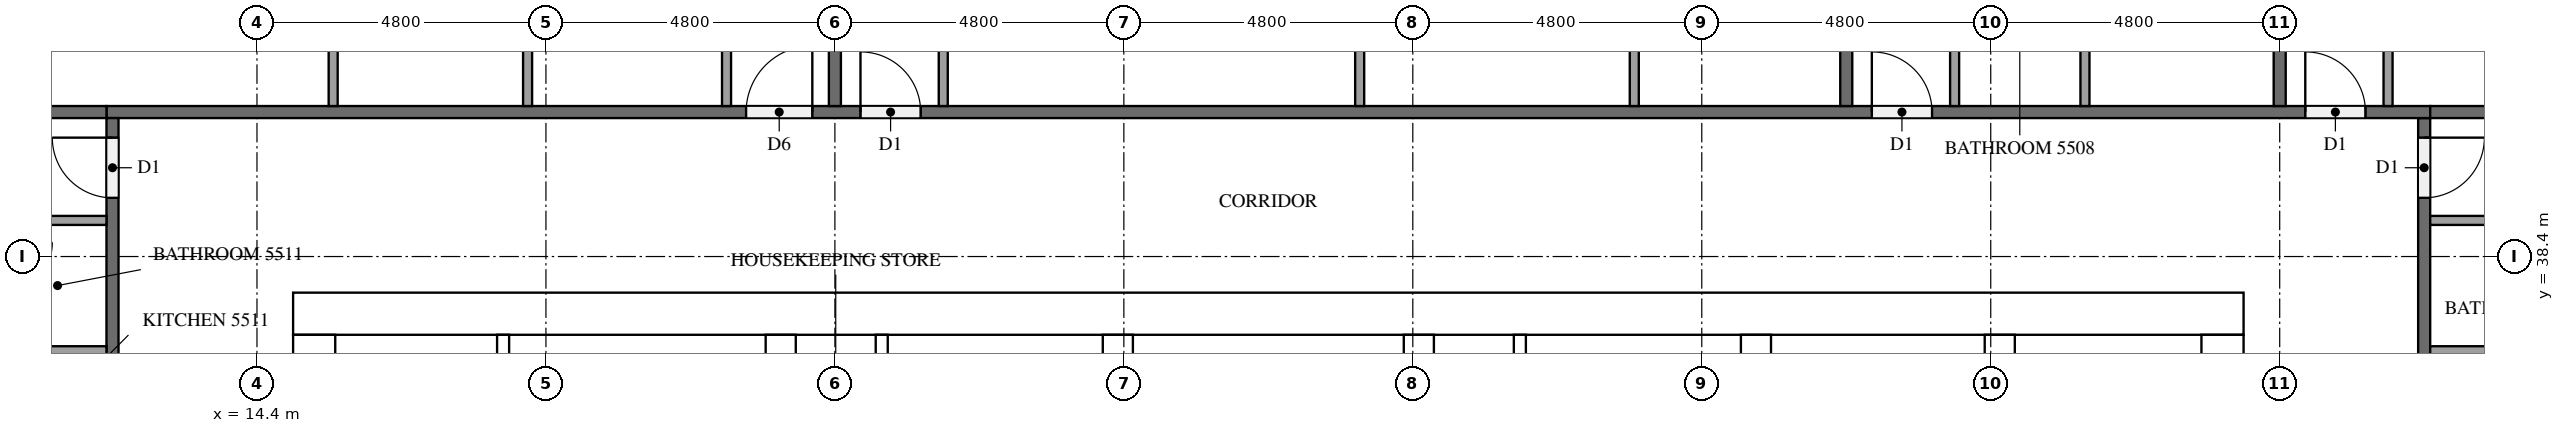
"""IFC4 building model, lengths in metres.
Left out: names, types, materials, properties, quantities, classifications, styles, units other than length and angle.
Written with IfcOpenShell. Run it as: python <this file> out.ifc"""

import sys

from ifc_helpers import new_model, si_unit, direction, frame, frame_2d, origin, place, context, subcontext, project, spatial, rectangle, extrude, element, fill, save


model = new_model("IFC4")
c1 = context("Model", 3, precision=1e-05, world=origin(), true_north=direction((0.0, 1.0)))
c2 = subcontext(c1, "Body", "Model", "MODEL_VIEW")
j1 = project(units=[si_unit("LENGTHUNIT", "METRE"), si_unit("PLANEANGLEUNIT", "RADIAN")], contexts=[c1])
p1 = place(None, origin())
s1 = spatial("IfcSite", under=j1, at=p1, CompositionType="ELEMENT")
p2 = place(p1, origin())
s2 = spatial("IfcBuilding", under=s1, at=p2, CompositionType="ELEMENT")
p3 = place(p2, frame((0.0, 0.0, 212.3)))
s3 = spatial("IfcBuildingStorey", under=s2, at=p3, CompositionType="ELEMENT", Elevation=212.3)
p4 = place(p3, frame((15.0, 37.45, 0.0), z_axis=(0.0, 0.0, 1.0), x_axis=(1.0, 0.0, 0.0)))
e1 = element("IfcWall", 1, at=p4, inside=s3, PredefinedType="SHEAR", context=c2, shape_type="SweptSolid", body=[
    extrude(rectangle(XDim=32.4, YDim=0.7, at=frame_2d((16.2, 0.0))), origin(), (0.0, 0.0, 1.0), 3.2),
])
p5 = place(p4, frame((15.3, 0.0, 0.0)))
e2 = element("IfcOpeningElement", 2, at=p5, cuts=e1, PredefinedType="OPENING", context=c2, shape_type="SweptSolid", body=[
    extrude(rectangle(XDim=1.8, YDim=2.1, at=frame_2d((0.9, 1.05))), frame((0.0, 0.36, 0.0), z_axis=(0.0, -1.0, 0.0), x_axis=(1.0, 0.0, 0.0)), (0.0, 0.0, 1.0), 0.72),
])
p6 = place(p4, frame((1.544, 0.0, 0.0)))
e3 = element("IfcOpeningElement", 3, at=p6, cuts=e1, PredefinedType="OPENING", context=c2, shape_type="SweptSolid", body=[
    extrude(rectangle(XDim=1.0, YDim=2.1, at=frame_2d((0.5, 1.05))), frame((0.0, 0.36, 0.0), z_axis=(0.0, -1.0, 0.0), x_axis=(1.0, 0.0, 0.0)), (0.0, 0.0, 1.0), 0.72),
])
p7 = place(p4, frame((5.219, 0.0, 0.0)))
e4 = element("IfcOpeningElement", 4, at=p7, cuts=e1, PredefinedType="OPENING", context=c2, shape_type="SweptSolid", body=[
    extrude(rectangle(XDim=1.0, YDim=2.1, at=frame_2d((0.5, 1.05))), frame((0.0, 0.36, 0.0), z_axis=(0.0, -1.0, 0.0), x_axis=(1.0, 0.0, 0.0)), (0.0, 0.0, 1.0), 0.72),
])
p8 = place(p3, frame((15.35, 15.7, 0.0), z_axis=(0.0, 0.0, 1.0), x_axis=(0.0, 1.0, 0.0)))
e5 = element("IfcWall", 5, at=p8, inside=s3, PredefinedType="SHEAR", context=c2, shape_type="SweptSolid", body=[
    extrude(rectangle(XDim=21.4, YDim=0.7, at=frame_2d((10.7, 0.0))), origin(), (0.0, 0.0, 1.0), 3.2),
])
p9 = place(p8, frame((5.06, 0.0, 0.0)))
e6 = element("IfcOpeningElement", 6, at=p9, cuts=e5, PredefinedType="OPENING", context=c2, shape_type="SweptSolid", body=[
    extrude(rectangle(XDim=1.2, YDim=2.1, at=frame_2d((0.6, 1.05))), frame((0.0, 0.36, 0.0), z_axis=(0.0, -1.0, 0.0), x_axis=(1.0, 0.0, 0.0)), (0.0, 0.0, 1.0), 0.72),
])
p10 = place(p3, frame((47.05, 15.7, 0.0), z_axis=(0.0, 0.0, 1.0), x_axis=(0.0, 1.0, 0.0)))
e7 = element("IfcWall", 7, at=p10, inside=s3, PredefinedType="SHEAR", context=c2, shape_type="SweptSolid", body=[
    extrude(rectangle(XDim=21.4, YDim=0.7, at=frame_2d((10.7, 0.0))), origin(), (0.0, 0.0, 1.0), 3.2),
])
p11 = place(p10, frame((10.4, 0.0, 0.0)))
e8 = element("IfcOpeningElement", 8, at=p11, cuts=e7, PredefinedType="OPENING", context=c2, shape_type="SweptSolid", body=[
    extrude(rectangle(XDim=1.2, YDim=2.1, at=frame_2d((0.6, 1.05))), frame((0.0, 0.36, 0.0), z_axis=(0.0, -1.0, 0.0), x_axis=(1.0, 0.0, 0.0)), (0.0, 0.0, 1.0), 0.72),
])
p12 = place(p3, frame((23.1, 15.7, 0.0), z_axis=(0.0, 0.0, 1.0), x_axis=(0.0, 1.0, 0.0)))
e9 = element("IfcWall", 9, at=p12, inside=s3, PredefinedType="SHEAR", context=c2, shape_type="SweptSolid", body=[
    extrude(rectangle(XDim=21.4, YDim=0.5, at=frame_2d((10.7, 0.0))), origin(), (0.0, 0.0, 1.0), 3.2),
])
p13 = place(p3, frame((39.3, 27.75, 0.0), z_axis=(0.0, 0.0, 1.0), x_axis=(0.0, 1.0, 0.0)))
e10 = element("IfcWall", 10, at=p13, inside=s3, PredefinedType="SHEAR", context=c2, shape_type="SweptSolid", body=[
    extrude(rectangle(XDim=9.35, YDim=0.5, at=frame_2d((4.675, 0.0))), origin(), (0.0, 0.0, 1.0), 3.2),
])
p14 = place(p3, frame((43.35, 27.75, 0.0), z_axis=(0.0, 0.0, 1.0), x_axis=(0.0, 1.0, 0.0)))
e11 = element("IfcWall", 11, at=p14, inside=s3, PredefinedType="SHEAR", context=c2, shape_type="SweptSolid", body=[
    extrude(rectangle(XDim=9.35, YDim=0.5, at=frame_2d((4.675, 0.0))), origin(), (0.0, 0.0, 1.0), 3.2),
])
p15 = place(p14, frame((7.65, 0.0, 0.0)))
e12 = element("IfcOpeningElement", 12, at=p15, cuts=e11, PredefinedType="OPENING", context=c2, shape_type="SweptSolid", body=[
    extrude(rectangle(XDim=1.2, YDim=2.1, at=frame_2d((0.6, 1.05))), frame((0.0, 0.26, 0.0), z_axis=(0.0, -1.0, 0.0), x_axis=(1.0, 0.0, 0.0)), (0.0, 0.0, 1.0), 0.52),
])
for number, where, z_axis, x_axis in (
    (13, (28.7, 33.8, 0.0), (0.0, 0.0, 1.0), (0.0, 1.0, 0.0)),
    (14, (33.7, 33.8, 0.0), (0.0, 0.0, 1.0), (0.0, 1.0, 0.0)),
):
    element("IfcWall", number, at=place(p3, frame(where, z_axis=z_axis, x_axis=x_axis)), inside=s3, PredefinedType="SHEAR", context=c2, shape_type="SweptSolid", body=[
        extrude(rectangle(XDim=3.3, YDim=0.5, at=frame_2d((1.65, 0.0))), origin(), (0.0, 0.0, 1.0), 3.2),
    ])
p16 = place(p3, frame((18.489, 31.5, 0.0), z_axis=(0.0, 0.0, 1.0), x_axis=(0.0, 1.0, 0.0)))
e15 = element("IfcWall", 15, at=p16, inside=s3, PredefinedType="PARTITIONING", context=c2, shape_type="SweptSolid", body=[
    extrude(rectangle(XDim=5.6, YDim=0.2, at=frame_2d((2.8, 0.0))), origin(), (0.0, 0.0, 1.0), 3.2),
])
for number, where, z_axis, x_axis in (
    (16, (24.778, 33.8, 0.0), (0.0, 0.0, 1.0), (0.0, 1.0, 0.0)),
    (17, (35.378, 33.8, 0.0), (0.0, 0.0, 1.0), (0.0, 1.0, 0.0)),
):
    element("IfcWall", number, at=place(p3, frame(where, z_axis=z_axis, x_axis=x_axis)), inside=s3, PredefinedType="PARTITIONING", context=c2, shape_type="SweptSolid", body=[
        extrude(rectangle(XDim=3.3, YDim=0.2, at=frame_2d((1.65, 0.0))), origin(), (0.0, 0.0, 1.0), 3.2),
    ])
p17 = place(p3, frame((50.4, 40.7, 0.0), z_axis=(0.0, 0.0, 1.0), x_axis=(0.0, -1.0, 0.0)))
e18 = element("IfcWall", 18, at=p17, inside=s3, PredefinedType="PARTITIONING", context=c2, shape_type="SweptSolid", body=[
    extrude(rectangle(XDim=28.6, YDim=0.2, at=frame_2d((14.3, 0.0))), origin(), (0.0, 0.0, 1.0), 3.2),
])
p18 = place(p17, frame((19.525, 0.0, 0.0)))
e19 = element("IfcOpeningElement", 19, at=p18, cuts=e18, PredefinedType="OPENING", context=c2, shape_type="SweptSolid", body=[
    extrude(rectangle(XDim=1.0, YDim=2.1, at=frame_2d((0.5, 1.05))), frame((0.0, 0.11, 0.0), z_axis=(0.0, -1.0, 0.0), x_axis=(1.0, 0.0, 0.0)), (0.0, 0.0, 1.0), 0.22),
])
p19 = place(p17, frame((7.525, 0.0, 0.0)))
e20 = element("IfcOpeningElement", 20, at=p19, cuts=e18, PredefinedType="OPENING", context=c2, shape_type="SweptSolid", body=[
    extrude(rectangle(XDim=1.0, YDim=2.1, at=frame_2d((0.5, 1.05))), frame((0.0, 0.11, 0.0), z_axis=(0.0, -1.0, 0.0), x_axis=(1.0, 0.0, 0.0)), (0.0, 0.0, 1.0), 0.22),
])
p20 = place(p17, frame((0.325, 0.0, 0.0)))
e21 = element("IfcOpeningElement", 21, at=p20, cuts=e18, PredefinedType="OPENING", context=c2, shape_type="SweptSolid", body=[
    extrude(rectangle(XDim=1.0, YDim=2.1, at=frame_2d((0.5, 1.05))), frame((0.0, 0.11, 0.0), z_axis=(0.0, -1.0, 0.0), x_axis=(1.0, 0.0, 0.0)), (0.0, 0.0, 1.0), 0.22),
])
p21 = place(p3, frame((11.9, 40.8, 0.0), z_axis=(0.0, 0.0, 1.0), x_axis=(1.0, 0.0, 0.0)))
e22 = element("IfcWall", 22, at=p21, inside=s3, PredefinedType="PARTITIONING", context=c2, shape_type="SweptSolid", body=[
    extrude(rectangle(XDim=38.6, YDim=0.2, at=frame_2d((19.3, 0.0))), origin(), (0.0, 0.0, 1.0), 3.2),
])
p22 = place(p21, frame((36.525, 0.0, 0.0)))
e23 = element("IfcOpeningElement", 23, at=p22, cuts=e22, PredefinedType="OPENING", context=c2, shape_type="SweptSolid", body=[
    extrude(rectangle(XDim=1.0, YDim=2.1, at=frame_2d((0.5, 1.05))), frame((0.0, 0.11, 0.0), z_axis=(0.0, -1.0, 0.0), x_axis=(1.0, 0.0, 0.0)), (0.0, 0.0, 1.0), 0.22),
])
p23 = place(p21, frame((29.325, 0.0, 0.0)))
e24 = element("IfcOpeningElement", 24, at=p23, cuts=e22, PredefinedType="OPENING", context=c2, shape_type="SweptSolid", body=[
    extrude(rectangle(XDim=1.0, YDim=2.1, at=frame_2d((0.5, 1.05))), frame((0.0, 0.11, 0.0), z_axis=(0.0, -1.0, 0.0), x_axis=(1.0, 0.0, 0.0)), (0.0, 0.0, 1.0), 0.22),
])
p24 = place(p21, frame((12.525, 0.0, 0.0)))
e25 = element("IfcOpeningElement", 25, at=p24, cuts=e22, PredefinedType="OPENING", context=c2, shape_type="SweptSolid", body=[
    extrude(rectangle(XDim=1.0, YDim=2.1, at=frame_2d((0.5, 1.05))), frame((0.0, 0.11, 0.0), z_axis=(0.0, -1.0, 0.0), x_axis=(1.0, 0.0, 0.0)), (0.0, 0.0, 1.0), 0.22),
])
p25 = place(p21, frame((10.625, 0.0, 0.0)))
e26 = element("IfcOpeningElement", 26, at=p25, cuts=e22, PredefinedType="OPENING", context=c2, shape_type="SweptSolid", body=[
    extrude(rectangle(XDim=1.1, YDim=2.1, at=frame_2d((0.55, 1.05))), frame((0.0, 0.11, 0.0), z_axis=(0.0, -1.0, 0.0), x_axis=(1.0, 0.0, 0.0)), (0.0, 0.0, 1.0), 0.22),
])
p26 = place(p3, frame((12.0, 12.1, 0.0), z_axis=(0.0, 0.0, 1.0), x_axis=(0.0, 1.0, 0.0)))
e27 = element("IfcWall", 27, at=p26, inside=s3, PredefinedType="PARTITIONING", context=c2, shape_type="SweptSolid", body=[
    extrude(rectangle(XDim=28.6, YDim=0.2, at=frame_2d((14.3, 0.0))), origin(), (0.0, 0.0, 1.0), 3.2),
])
p27 = place(p26, frame((27.275, 0.0, 0.0)))
e28 = element("IfcOpeningElement", 28, at=p27, cuts=e27, PredefinedType="OPENING", context=c2, shape_type="SweptSolid", body=[
    extrude(rectangle(XDim=1.0, YDim=2.1, at=frame_2d((0.5, 1.05))), frame((0.0, 0.11, 0.0), z_axis=(0.0, -1.0, 0.0), x_axis=(1.0, 0.0, 0.0)), (0.0, 0.0, 1.0), 0.22),
])
p28 = place(p26, frame((12.325, 0.0, 0.0)))
e29 = element("IfcOpeningElement", 29, at=p28, cuts=e27, PredefinedType="OPENING", context=c2, shape_type="SweptSolid", body=[
    extrude(rectangle(XDim=1.0, YDim=2.1, at=frame_2d((0.5, 1.05))), frame((0.0, 0.11, 0.0), z_axis=(0.0, -1.0, 0.0), x_axis=(1.0, 0.0, 0.0)), (0.0, 0.0, 1.0), 0.22),
])
p29 = place(p26, frame((2.725, 0.0, 0.0)))
e30 = element("IfcOpeningElement", 30, at=p29, cuts=e27, PredefinedType="OPENING", context=c2, shape_type="SweptSolid", body=[
    extrude(rectangle(XDim=1.0, YDim=2.1, at=frame_2d((0.5, 1.05))), frame((0.0, 0.11, 0.0), z_axis=(0.0, -1.0, 0.0), x_axis=(1.0, 0.0, 0.0)), (0.0, 0.0, 1.0), 0.22),
])
p30 = place(p26, frame((0.875, 0.0, 0.0)))
e31 = element("IfcOpeningElement", 31, at=p30, cuts=e27, PredefinedType="OPENING", context=c2, shape_type="SweptSolid", body=[
    extrude(rectangle(XDim=1.0, YDim=2.1, at=frame_2d((0.5, 1.05))), frame((0.0, 0.11, 0.0), z_axis=(0.0, -1.0, 0.0), x_axis=(1.0, 0.0, 0.0)), (0.0, 0.0, 1.0), 0.22),
])
p31 = place(p3, frame((50.5, 40.8, 0.0), z_axis=(0.0, 0.0, 1.0), x_axis=(1.0, 0.0, 0.0)))
e32 = element("IfcWall", 32, at=p31, inside=s3, PredefinedType="PARTITIONING", context=c2, shape_type="SweptSolid", body=[
    extrude(rectangle(XDim=11.8, YDim=0.2, at=frame_2d((5.9, 0.0))), origin(), (0.0, 0.0, 1.0), 3.2),
])
p32 = place(p3, frame((48.0, 52.475, 0.0), z_axis=(0.0, 0.0, 1.0), x_axis=(0.0, -1.0, 0.0)))
e33 = element("IfcWall", 33, at=p32, inside=s3, PredefinedType="PARTITIONING", context=c2, shape_type="SweptSolid", body=[
    extrude(rectangle(XDim=11.575, YDim=0.2, at=frame_2d((5.788, 0.0))), origin(), (0.0, 0.0, 1.0), 3.2),
])
for number, where, z_axis, x_axis in (
    (34, (40.8, 52.7, 0.0), (0.0, 0.0, 1.0), (0.0, -1.0, 0.0)),
    (35, (24.0, 52.7, 0.0), (0.0, 0.0, 1.0), (0.0, -1.0, 0.0)),
):
    element("IfcWall", number, at=place(p3, frame(where, z_axis=z_axis, x_axis=x_axis)), inside=s3, PredefinedType="PARTITIONING", context=c2, shape_type="SweptSolid", body=[
        extrude(rectangle(XDim=11.8, YDim=0.2, at=frame_2d((5.9, 0.0))), origin(), (0.0, 0.0, 1.0), 3.2),
    ])
p33 = place(p3, frame((4.9, 40.8, 0.0), z_axis=(0.0, 0.0, 1.0), x_axis=(1.0, 0.0, 0.0)))
e36 = element("IfcWall", 36, at=p33, inside=s3, PredefinedType="PARTITIONING", context=c2, shape_type="SweptSolid", body=[
    extrude(rectangle(XDim=7.0, YDim=0.2, at=frame_2d((3.5, 0.0))), origin(), (0.0, 0.0, 1.0), 3.2),
])
p34 = place(p3, frame((50.5, 36.835, 0.0), z_axis=(0.0, 0.0, 1.0), x_axis=(1.0, 0.0, 0.0)))
e37 = element("IfcWall", 37, at=p34, inside=s3, PredefinedType="PARTITIONING", context=c2, shape_type="SweptSolid", body=[
    extrude(rectangle(XDim=2.975, YDim=0.15, at=frame_2d((1.488, 0.0))), origin(), (0.0, 0.0, 1.0), 3.2),
])
p35 = place(p3, frame((50.5, 39.0, 0.0), z_axis=(0.0, 0.0, 1.0), x_axis=(1.0, 0.0, 0.0)))
e38 = element("IfcWall", 38, at=p35, inside=s3, PredefinedType="PARTITIONING", context=c2, shape_type="SweptSolid", body=[
    extrude(rectangle(XDim=3.125, YDim=0.15, at=frame_2d((1.562, 0.0))), origin(), (0.0, 0.0, 1.0), 3.2),
])
p36 = place(p3, frame((49.8, 40.9, 0.0), z_axis=(0.0, 0.0, 1.0), x_axis=(0.0, 1.0, 0.0)))
e39 = element("IfcWall", 39, at=p36, inside=s3, PredefinedType="PARTITIONING", context=c2, shape_type="SweptSolid", body=[
    extrude(rectangle(XDim=3.425, YDim=0.15, at=frame_2d((1.712, 0.0))), origin(), (0.0, 0.0, 1.0), 3.2),
])
p37 = place(p3, frame((44.765, 40.9, 0.0), z_axis=(0.0, 0.0, 1.0), x_axis=(0.0, 1.0, 0.0)))
e40 = element("IfcWall", 40, at=p37, inside=s3, PredefinedType="PARTITIONING", context=c2, shape_type="SweptSolid", body=[
    extrude(rectangle(XDim=4.325, YDim=0.15, at=frame_2d((2.163, 0.0))), origin(), (0.0, 0.0, 1.0), 3.2),
])
p38 = place(p3, frame((42.6, 40.9, 0.0), z_axis=(0.0, 0.0, 1.0), x_axis=(0.0, 1.0, 0.0)))
e41 = element("IfcWall", 41, at=p38, inside=s3, PredefinedType="PARTITIONING", context=c2, shape_type="SweptSolid", body=[
    extrude(rectangle(XDim=4.475, YDim=0.15, at=frame_2d((2.238, 0.0))), origin(), (0.0, 0.0, 1.0), 3.2),
])
for number, where, z_axis, x_axis in (
    (42, (32.717, 40.9, 0.0), (0.0, 0.0, 1.0), (0.0, 1.0, 0.0)),
    (43, (37.279, 40.9, 0.0), (0.0, 0.0, 1.0), (0.0, 1.0, 0.0)),
):
    element("IfcWall", number, at=place(p3, frame(where, z_axis=z_axis, x_axis=x_axis)), inside=s3, PredefinedType="PARTITIONING", context=c2, shape_type="SweptSolid", body=[
        extrude(rectangle(XDim=4.175, YDim=0.15, at=frame_2d((2.087, 0.0))), origin(), (0.0, 0.0, 1.0), 3.2),
    ])
p39 = place(p3, frame((25.8, 40.9, 0.0), z_axis=(0.0, 0.0, 1.0), x_axis=(0.0, 1.0, 0.0)))
e44 = element("IfcWall", 44, at=p39, inside=s3, PredefinedType="PARTITIONING", context=c2, shape_type="SweptSolid", body=[
    extrude(rectangle(XDim=4.325, YDim=0.15, at=frame_2d((2.163, 0.0))), origin(), (0.0, 0.0, 1.0), 3.2),
])
for number, where, z_axis, x_axis in (
    (45, (18.895, 40.9, 0.0), (0.0, 0.0, 1.0), (0.0, 1.0, 0.0)),
    (46, (15.666, 40.9, 0.0), (0.0, 0.0, 1.0), (0.0, 1.0, 0.0)),
):
    element("IfcWall", number, at=place(p3, frame(where, z_axis=z_axis, x_axis=x_axis)), inside=s3, PredefinedType="PARTITIONING", context=c2, shape_type="SweptSolid", body=[
        extrude(rectangle(XDim=3.125, YDim=0.15, at=frame_2d((1.562, 0.0))), origin(), (0.0, 0.0, 1.0), 3.2),
    ])
p40 = place(p3, frame((22.2, 40.9, 0.0), z_axis=(0.0, 0.0, 1.0), x_axis=(0.0, 1.0, 0.0)))
e47 = element("IfcWall", 47, at=p40, inside=s3, PredefinedType="PARTITIONING", context=c2, shape_type="SweptSolid", body=[
    extrude(rectangle(XDim=3.275, YDim=0.15, at=frame_2d((1.638, 0.0))), origin(), (0.0, 0.0, 1.0), 3.2),
])
p41 = place(p3, frame((11.9, 36.835, 0.0), z_axis=(0.0, 0.0, 1.0), x_axis=(-1.0, 0.0, 0.0)))
e48 = element("IfcWall", 48, at=p41, inside=s3, PredefinedType="PARTITIONING", context=c2, shape_type="SweptSolid", body=[
    extrude(rectangle(XDim=1.625, YDim=0.15, at=frame_2d((0.812, 0.0))), origin(), (0.0, 0.0, 1.0), 3.2),
])
p42 = place(p3, frame((11.9, 39.0, 0.0), z_axis=(0.0, 0.0, 1.0), x_axis=(-1.0, 0.0, 0.0)))
e49 = element("IfcWall", 49, at=p42, inside=s3, PredefinedType="PARTITIONING", context=c2, shape_type="SweptSolid", body=[
    extrude(rectangle(XDim=1.775, YDim=0.15, at=frame_2d((0.887, 0.0))), origin(), (0.0, 0.0, 1.0), 3.2),
])
p43 = place(p5, origin())
e50 = element("IfcDoor", 50, at=p43, inside=s3, OperationType="DOUBLE_DOOR_SINGLE_SWING", PredefinedType="DOOR", context=c2, shape_type="SweptSolid", body=[
    extrude(rectangle(XDim=1.8, YDim=2.1, at=frame_2d((0.9, 1.05))), frame((0.0, 0.025, 0.0), z_axis=(0.0, -1.0, 0.0), x_axis=(1.0, 0.0, 0.0)), (0.0, 0.0, 1.0), 0.05),
])
fill(e2, e50)
p44 = place(p6, origin())
e51 = element("IfcDoor", 51, at=p44, inside=s3, OperationType="SINGLE_SWING_RIGHT", PredefinedType="DOOR", context=c2, shape_type="SweptSolid", body=[
    extrude(rectangle(XDim=1.0, YDim=2.1, at=frame_2d((0.5, 1.05))), frame((0.0, 0.025, 0.0), z_axis=(0.0, -1.0, 0.0), x_axis=(1.0, 0.0, 0.0)), (0.0, 0.0, 1.0), 0.05),
])
fill(e3, e51)
p45 = place(p7, origin())
e52 = element("IfcDoor", 52, at=p45, inside=s3, OperationType="SINGLE_SWING_LEFT", PredefinedType="DOOR", context=c2, shape_type="SweptSolid", body=[
    extrude(rectangle(XDim=1.0, YDim=2.1, at=frame_2d((0.5, 1.05))), frame((0.0, 0.025, 0.0), z_axis=(0.0, -1.0, 0.0), x_axis=(1.0, 0.0, 0.0)), (0.0, 0.0, 1.0), 0.05),
])
fill(e4, e52)
p46 = place(p20, origin())
e53 = element("IfcDoor", 53, at=p46, inside=s3, OperationType="SINGLE_SWING_LEFT", PredefinedType="DOOR", context=c2, shape_type="SweptSolid", body=[
    extrude(rectangle(XDim=1.0, YDim=2.1, at=frame_2d((0.5, 1.05))), frame((0.0, 0.025, 0.0), z_axis=(0.0, -1.0, 0.0), x_axis=(1.0, 0.0, 0.0)), (0.0, 0.0, 1.0), 0.05),
])
fill(e21, e53)
p47 = place(p22, origin())
e54 = element("IfcDoor", 54, at=p47, inside=s3, OperationType="SINGLE_SWING_LEFT", PredefinedType="DOOR", context=c2, shape_type="SweptSolid", body=[
    extrude(rectangle(XDim=1.0, YDim=2.1, at=frame_2d((0.5, 1.05))), frame((0.0, 0.025, 0.0), z_axis=(0.0, -1.0, 0.0), x_axis=(1.0, 0.0, 0.0)), (0.0, 0.0, 1.0), 0.05),
])
fill(e23, e54)
p48 = place(p23, origin())
e55 = element("IfcDoor", 55, at=p48, inside=s3, OperationType="SINGLE_SWING_LEFT", PredefinedType="DOOR", context=c2, shape_type="SweptSolid", body=[
    extrude(rectangle(XDim=1.0, YDim=2.1, at=frame_2d((0.5, 1.05))), frame((0.0, 0.025, 0.0), z_axis=(0.0, -1.0, 0.0), x_axis=(1.0, 0.0, 0.0)), (0.0, 0.0, 1.0), 0.05),
])
fill(e24, e55)
p49 = place(p24, origin())
e56 = element("IfcDoor", 56, at=p49, inside=s3, OperationType="SINGLE_SWING_LEFT", PredefinedType="DOOR", context=c2, shape_type="SweptSolid", body=[
    extrude(rectangle(XDim=1.0, YDim=2.1, at=frame_2d((0.5, 1.05))), frame((0.0, 0.025, 0.0), z_axis=(0.0, -1.0, 0.0), x_axis=(1.0, 0.0, 0.0)), (0.0, 0.0, 1.0), 0.05),
])
fill(e25, e56)
p50 = place(p25, origin())
e57 = element("IfcDoor", 57, at=p50, inside=s3, OperationType="SINGLE_SWING_RIGHT", PredefinedType="DOOR", context=c2, shape_type="SweptSolid", body=[
    extrude(rectangle(XDim=1.1, YDim=2.1, at=frame_2d((0.55, 1.05))), frame((0.0, 0.025, 0.0), z_axis=(0.0, -1.0, 0.0), x_axis=(1.0, 0.0, 0.0)), (0.0, 0.0, 1.0), 0.05),
])
fill(e26, e57)
p51 = place(p27, origin())
e58 = element("IfcDoor", 58, at=p51, inside=s3, OperationType="SINGLE_SWING_RIGHT", PredefinedType="DOOR", context=c2, shape_type="SweptSolid", body=[
    extrude(rectangle(XDim=1.0, YDim=2.1, at=frame_2d((0.5, 1.05))), frame((0.0, 0.025, 0.0), z_axis=(0.0, -1.0, 0.0), x_axis=(1.0, 0.0, 0.0)), (0.0, 0.0, 1.0), 0.05),
])
fill(e28, e58)
save(model, sys.argv[1])
